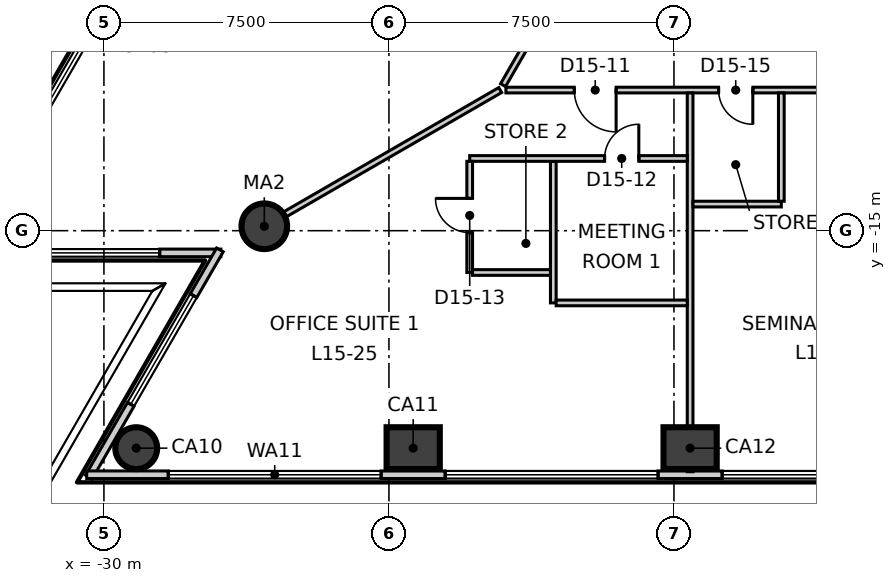
"""IFC4 building model, lengths in metres.
Left out: names, types, materials, properties, quantities, classifications, styles, units other than length and angle.
Written with IfcOpenShell. Run it as: python <this file> out.ifc"""

import sys

from ifc_helpers import new_model, si_unit, direction, frame, frame_2d, origin, origin_2d, place, context, subcontext, project, spatial, rectangle, circle, extrude, element, fill, save


model = new_model("IFC4")
c1 = context("Model", 3, precision=1e-05, world=origin(), true_north=direction((0.0, 1.0)))
c2 = subcontext(c1, "Body", "Model", "MODEL_VIEW")
j1 = project(units=[si_unit("LENGTHUNIT", "METRE"), si_unit("PLANEANGLEUNIT", "RADIAN")], contexts=[c1])
p1 = place(None, origin())
s1 = spatial("IfcSite", under=j1, at=p1, CompositionType="ELEMENT")
p2 = place(p1, origin())
s2 = spatial("IfcBuilding", under=s1, at=p2, CompositionType="ELEMENT")
p3 = place(p2, frame((0.0, 0.0, 71.3)))
s3 = spatial("IfcBuildingStorey", under=s2, at=p3, CompositionType="ELEMENT", Elevation=71.3)
p4 = place(p3, frame((-29.15, -20.722, -0.3), z_axis=(0.0, 0.0, 1.0), x_axis=(1.0, 0.0, 0.0)))
e1 = element("IfcColumn", 1, at=p4, inside=s3, PredefinedType="COLUMN", context=c2, shape_type="SweptSolid", body=[
    extrude(circle(Radius=0.55, at=origin_2d()), origin(), (0.0, 0.0, 1.0), 4.0),
])
for number, where, z_axis, x_axis in (
    (2, (-21.862, -20.722, -0.3), (0.0, 0.0, 1.0), (1.0, 0.0, 0.0)),
    (3, (-14.575, -20.722, -0.3), (0.0, 0.0, 1.0), (1.0, 0.0, 0.0)),
):
    element("IfcColumn", number, at=place(p3, frame(where, z_axis=z_axis, x_axis=x_axis)), inside=s3, PredefinedType="COLUMN", context=c2, shape_type="SweptSolid", body=[
        extrude(rectangle(XDim=1.4, YDim=1.1, at=origin_2d()), origin(), (0.0, 0.0, 1.0), 4.0),
    ])
p5 = place(p3, frame((-25.78, -14.884, -0.3), z_axis=(0.0, 0.0, 1.0), x_axis=(1.0, 0.0, 0.0)))
e4 = element("IfcColumn", 4, at=p5, inside=s3, PredefinedType="COLUMN", context=c2, shape_type="SweptSolid", body=[
    extrude(circle(Radius=0.6, at=origin_2d()), origin(), (0.0, 0.0, 1.0), 4.0),
])
p6 = place(p3, frame((-3.326, 37.084, 0.0), z_axis=(0.0, 0.0, 1.0), x_axis=(-0.500000131003, -0.86602532815, 0.0)))
e5 = element("IfcWall", 5, at=p6, inside=s3, PredefinedType="ELEMENTEDWALL", context=c2, shape_type="SweptSolid", body=[
    extrude(rectangle(XDim=60.886, YDim=0.2, at=frame_2d((30.443, 0.0))), origin(), (0.0, 0.0, 1.0), 3.7),
])
p7 = place(p6, frame((2.146, 0.0, 0.9)))
e6 = element("IfcOpeningElement", 6, at=p7, cuts=e5, PredefinedType="OPENING", context=c2, shape_type="SweptSolid", body=[
    extrude(rectangle(XDim=5.6, YDim=2.5, at=frame_2d((2.8, 1.25))), frame((0.0, 0.11, 0.0), z_axis=(0.0, -1.0, 0.0), x_axis=(1.0, 0.0, 0.0)), (0.0, 0.0, 1.0), 0.22),
])
p8 = place(p6, frame((9.434, 0.0, 0.9)))
e7 = element("IfcOpeningElement", 7, at=p8, cuts=e5, PredefinedType="OPENING", context=c2, shape_type="SweptSolid", body=[
    extrude(rectangle(XDim=5.6, YDim=2.5, at=frame_2d((2.8, 1.25))), frame((0.0, 0.11, 0.0), z_axis=(0.0, -1.0, 0.0), x_axis=(1.0, 0.0, 0.0)), (0.0, 0.0, 1.0), 0.22),
])
p9 = place(p6, frame((16.721, 0.0, 0.9)))
e8 = element("IfcOpeningElement", 8, at=p9, cuts=e5, PredefinedType="OPENING", context=c2, shape_type="SweptSolid", body=[
    extrude(rectangle(XDim=5.6, YDim=2.5, at=frame_2d((2.8, 1.25))), frame((0.0, 0.11, 0.0), z_axis=(0.0, -1.0, 0.0), x_axis=(1.0, 0.0, 0.0)), (0.0, 0.0, 1.0), 0.22),
])
p10 = place(p6, frame((24.009, 0.0, 0.9)))
e9 = element("IfcOpeningElement", 9, at=p10, cuts=e5, PredefinedType="OPENING", context=c2, shape_type="SweptSolid", body=[
    extrude(rectangle(XDim=5.6, YDim=2.5, at=frame_2d((2.8, 1.25))), frame((0.0, 0.11, 0.0), z_axis=(0.0, -1.0, 0.0), x_axis=(1.0, 0.0, 0.0)), (0.0, 0.0, 1.0), 0.22),
])
p11 = place(p6, frame((31.297, 0.0, 0.9)))
e10 = element("IfcOpeningElement", 10, at=p11, cuts=e5, PredefinedType="OPENING", context=c2, shape_type="SweptSolid", body=[
    extrude(rectangle(XDim=5.6, YDim=2.5, at=frame_2d((2.8, 1.25))), frame((0.0, 0.11, 0.0), z_axis=(0.0, -1.0, 0.0), x_axis=(1.0, 0.0, 0.0)), (0.0, 0.0, 1.0), 0.22),
])
p12 = place(p6, frame((38.584, 0.0, 0.9)))
e11 = element("IfcOpeningElement", 11, at=p12, cuts=e5, PredefinedType="OPENING", context=c2, shape_type="SweptSolid", body=[
    extrude(rectangle(XDim=5.6, YDim=2.5, at=frame_2d((2.8, 1.25))), frame((0.0, 0.11, 0.0), z_axis=(0.0, -1.0, 0.0), x_axis=(1.0, 0.0, 0.0)), (0.0, 0.0, 1.0), 0.22),
])
p13 = place(p6, frame((45.872, 0.0, 0.9)))
e12 = element("IfcOpeningElement", 12, at=p13, cuts=e5, PredefinedType="OPENING", context=c2, shape_type="SweptSolid", body=[
    extrude(rectangle(XDim=5.6, YDim=2.5, at=frame_2d((2.8, 1.25))), frame((0.0, 0.11, 0.0), z_axis=(0.0, -1.0, 0.0), x_axis=(1.0, 0.0, 0.0)), (0.0, 0.0, 1.0), 0.22),
])
p14 = place(p6, frame((53.159, 0.0, 0.9)))
e13 = element("IfcOpeningElement", 13, at=p14, cuts=e5, PredefinedType="OPENING", context=c2, shape_type="SweptSolid", body=[
    extrude(rectangle(XDim=5.6, YDim=2.5, at=frame_2d((2.8, 1.25))), frame((0.0, 0.11, 0.0), z_axis=(0.0, -1.0, 0.0), x_axis=(1.0, 0.0, 0.0)), (0.0, 0.0, 1.0), 0.22),
])
p15 = place(p3, frame((-33.824, -15.584, 0.0), z_axis=(0.0, 0.0, 1.0), x_axis=(1.0, 0.0, 0.0)))
e14 = element("IfcWall", 14, at=p15, inside=s3, PredefinedType="ELEMENTEDWALL", context=c2, shape_type="SweptSolid", body=[
    extrude(rectangle(XDim=6.901, YDim=0.2, at=frame_2d((3.45, 0.0))), origin(), (0.0, 0.0, 1.0), 3.7),
])
p16 = place(p15, frame((1.99, 0.0, 0.9)))
e15 = element("IfcOpeningElement", 15, at=p16, cuts=e14, PredefinedType="OPENING", context=c2, shape_type="SweptSolid", body=[
    extrude(rectangle(XDim=3.3, YDim=2.5, at=frame_2d((1.65, 1.25))), frame((0.0, 0.11, 0.0), z_axis=(0.0, -1.0, 0.0), x_axis=(1.0, 0.0, 0.0)), (0.0, 0.0, 1.0), 0.22),
])
p17 = place(p3, frame((-26.948, -15.506, 0.0), z_axis=(0.0, 0.0, 1.0), x_axis=(-0.499917428568, -0.866073071175, 0.0)))
e16 = element("IfcWall", 16, at=p17, inside=s3, PredefinedType="ELEMENTEDWALL", context=c2, shape_type="SweptSolid", body=[
    extrude(rectangle(XDim=6.901, YDim=0.2, at=frame_2d((3.451, 0.0))), origin(), (0.0, 0.0, 1.0), 3.7),
])
p18 = place(p17, frame((1.39, 0.0, 0.9)))
e17 = element("IfcOpeningElement", 17, at=p18, cuts=e16, PredefinedType="OPENING", context=c2, shape_type="SweptSolid", body=[
    extrude(rectangle(XDim=3.3, YDim=2.5, at=frame_2d((1.65, 1.25))), frame((0.0, 0.11, 0.0), z_axis=(0.0, -1.0, 0.0), x_axis=(1.0, 0.0, 0.0)), (0.0, 0.0, 1.0), 0.22),
])
p19 = place(p3, frame((-30.453, -21.422, 0.0), z_axis=(0.0, 0.0, 1.0), x_axis=(1.0, 0.0, 0.0)))
e18 = element("IfcWall", 18, at=p19, inside=s3, PredefinedType="ELEMENTEDWALL", context=c2, shape_type="SweptSolid", body=[
    extrude(rectangle(XDim=60.886, YDim=0.2, at=frame_2d((30.443, 0.0))), origin(), (0.0, 0.0, 1.0), 3.7),
])
p20 = place(p19, frame((2.147, 0.0, 0.9)))
e19 = element("IfcOpeningElement", 19, at=p20, cuts=e18, PredefinedType="OPENING", context=c2, shape_type="SweptSolid", body=[
    extrude(rectangle(XDim=5.6, YDim=2.5, at=frame_2d((2.8, 1.25))), frame((0.0, 0.11, 0.0), z_axis=(0.0, -1.0, 0.0), x_axis=(1.0, 0.0, 0.0)), (0.0, 0.0, 1.0), 0.22),
])
p21 = place(p19, frame((9.434, 0.0, 0.9)))
e20 = element("IfcOpeningElement", 20, at=p21, cuts=e18, PredefinedType="OPENING", context=c2, shape_type="SweptSolid", body=[
    extrude(rectangle(XDim=5.6, YDim=2.5, at=frame_2d((2.8, 1.25))), frame((0.0, 0.11, 0.0), z_axis=(0.0, -1.0, 0.0), x_axis=(1.0, 0.0, 0.0)), (0.0, 0.0, 1.0), 0.22),
])
p22 = place(p19, frame((16.722, 0.0, 0.9)))
e21 = element("IfcOpeningElement", 21, at=p22, cuts=e18, PredefinedType="OPENING", context=c2, shape_type="SweptSolid", body=[
    extrude(rectangle(XDim=5.6, YDim=2.5, at=frame_2d((2.8, 1.25))), frame((0.0, 0.11, 0.0), z_axis=(0.0, -1.0, 0.0), x_axis=(1.0, 0.0, 0.0)), (0.0, 0.0, 1.0), 0.22),
])
p23 = place(p19, frame((24.009, 0.0, 0.9)))
e22 = element("IfcOpeningElement", 22, at=p23, cuts=e18, PredefinedType="OPENING", context=c2, shape_type="SweptSolid", body=[
    extrude(rectangle(XDim=5.6, YDim=2.5, at=frame_2d((2.8, 1.25))), frame((0.0, 0.11, 0.0), z_axis=(0.0, -1.0, 0.0), x_axis=(1.0, 0.0, 0.0)), (0.0, 0.0, 1.0), 0.22),
])
p24 = place(p19, frame((31.297, 0.0, 0.9)))
e23 = element("IfcOpeningElement", 23, at=p24, cuts=e18, PredefinedType="OPENING", context=c2, shape_type="SweptSolid", body=[
    extrude(rectangle(XDim=5.6, YDim=2.5, at=frame_2d((2.8, 1.25))), frame((0.0, 0.11, 0.0), z_axis=(0.0, -1.0, 0.0), x_axis=(1.0, 0.0, 0.0)), (0.0, 0.0, 1.0), 0.22),
])
p25 = place(p19, frame((38.584, 0.0, 0.9)))
e24 = element("IfcOpeningElement", 24, at=p25, cuts=e18, PredefinedType="OPENING", context=c2, shape_type="SweptSolid", body=[
    extrude(rectangle(XDim=5.6, YDim=2.5, at=frame_2d((2.8, 1.25))), frame((0.0, 0.11, 0.0), z_axis=(0.0, -1.0, 0.0), x_axis=(1.0, 0.0, 0.0)), (0.0, 0.0, 1.0), 0.22),
])
p26 = place(p19, frame((45.872, 0.0, 0.9)))
e25 = element("IfcOpeningElement", 25, at=p26, cuts=e18, PredefinedType="OPENING", context=c2, shape_type="SweptSolid", body=[
    extrude(rectangle(XDim=5.6, YDim=2.5, at=frame_2d((2.8, 1.25))), frame((0.0, 0.11, 0.0), z_axis=(0.0, -1.0, 0.0), x_axis=(1.0, 0.0, 0.0)), (0.0, 0.0, 1.0), 0.22),
])
p27 = place(p19, frame((53.159, 0.0, 0.9)))
e26 = element("IfcOpeningElement", 26, at=p27, cuts=e18, PredefinedType="OPENING", context=c2, shape_type="SweptSolid", body=[
    extrude(rectangle(XDim=5.6, YDim=2.5, at=frame_2d((2.8, 1.25))), frame((0.0, 0.11, 0.0), z_axis=(0.0, -1.0, 0.0), x_axis=(1.0, 0.0, 0.0)), (0.0, 0.0, 1.0), 0.22),
])
p28 = place(p3, frame((-26.317, -15.194, 0.0), z_axis=(0.0, 0.0, 1.0), x_axis=(0.866031591824, 0.499989281847, 0.0)))
e27 = element("IfcWall", 27, at=p28, inside=s3, PredefinedType="PARTITIONING", context=c2, shape_type="SweptSolid", body=[
    extrude(rectangle(XDim=7.788, YDim=0.15, at=frame_2d((3.894, 0.0))), origin(), (0.0, 0.0, 1.0), 3.1),
])
p29 = place(p3, frame((-19.497, -11.17, 0.0), z_axis=(0.0, 0.0, 1.0), x_axis=(0.499998854553, 0.866026065108, 0.0)))
e28 = element("IfcWall", 28, at=p29, inside=s3, PredefinedType="PARTITIONING", context=c2, shape_type="SweptSolid", body=[
    extrude(rectangle(XDim=38.994, YDim=0.15, at=frame_2d((19.497, 0.0))), origin(), (0.0, 0.0, 1.0), 3.7),
])
p30 = place(p29, frame((35.944, 0.0, 0.0)))
e29 = element("IfcOpeningElement", 29, at=p30, cuts=e28, PredefinedType="OPENING", context=c2, shape_type="SweptSolid", body=[
    extrude(rectangle(XDim=1.1, YDim=2.1, at=frame_2d((0.55, 1.05))), frame((0.0, 0.085, 0.0), z_axis=(0.0, -1.0, 0.0), x_axis=(1.0, 0.0, 0.0)), (0.0, 0.0, 1.0), 0.17),
])
p31 = place(p29, frame((26.148, 0.0, 0.0)))
e30 = element("IfcOpeningElement", 30, at=p31, cuts=e28, PredefinedType="OPENING", context=c2, shape_type="SweptSolid", body=[
    extrude(rectangle(XDim=1.1, YDim=2.1, at=frame_2d((0.55, 1.05))), frame((0.0, 0.085, 0.0), z_axis=(0.0, -1.0, 0.0), x_axis=(1.0, 0.0, 0.0)), (0.0, 0.0, 1.0), 0.17),
])
p32 = place(p29, frame((8.572, 0.0, 0.0)))
e31 = element("IfcOpeningElement", 31, at=p32, cuts=e28, PredefinedType="OPENING", context=c2, shape_type="SweptSolid", body=[
    extrude(rectangle(XDim=1.1, YDim=2.1, at=frame_2d((0.55, 1.05))), frame((0.0, 0.085, 0.0), z_axis=(0.0, -1.0, 0.0), x_axis=(1.0, 0.0, 0.0)), (0.0, 0.0, 1.0), 0.17),
])
p33 = place(p29, frame((17.172, 0.0, 0.0)))
e32 = element("IfcOpeningElement", 32, at=p33, cuts=e28, PredefinedType="OPENING", context=c2, shape_type="SweptSolid", body=[
    extrude(rectangle(XDim=0.9, YDim=2.1, at=frame_2d((0.45, 1.05))), frame((0.0, 0.085, 0.0), z_axis=(0.0, -1.0, 0.0), x_axis=(1.0, 0.0, 0.0)), (0.0, 0.0, 1.0), 0.17),
])
p34 = place(p29, frame((14.172, 0.0, 0.0)))
e33 = element("IfcOpeningElement", 33, at=p34, cuts=e28, PredefinedType="OPENING", context=c2, shape_type="SweptSolid", body=[
    extrude(rectangle(XDim=0.9, YDim=2.1, at=frame_2d((0.45, 1.05))), frame((0.0, 0.085, 0.0), z_axis=(0.0, -1.0, 0.0), x_axis=(1.0, 0.0, 0.0)), (0.0, 0.0, 1.0), 0.17),
])
p35 = place(p29, frame((1.797, 0.0, 0.0)))
e34 = element("IfcOpeningElement", 34, at=p35, cuts=e28, PredefinedType="OPENING", context=c2, shape_type="SweptSolid", body=[
    extrude(rectangle(XDim=1.1, YDim=2.1, at=frame_2d((0.55, 1.05))), frame((0.0, 0.085, 0.0), z_axis=(0.0, -1.0, 0.0), x_axis=(1.0, 0.0, 0.0)), (0.0, 0.0, 1.0), 0.17),
])
p36 = place(p3, frame((-19.422, -11.3, 0.0), z_axis=(0.0, 0.0, 1.0), x_axis=(1.0, 0.0, 0.0)))
e35 = element("IfcWall", 35, at=p36, inside=s3, PredefinedType="PARTITIONING", context=c2, shape_type="SweptSolid", body=[
    extrude(rectangle(XDim=38.994, YDim=0.15, at=frame_2d((19.497, 0.0))), origin(), (0.0, 0.0, 1.0), 3.7),
])
p37 = place(p36, frame((1.8, 0.0, 0.0)))
e36 = element("IfcOpeningElement", 36, at=p37, cuts=e35, PredefinedType="OPENING", context=c2, shape_type="SweptSolid", body=[
    extrude(rectangle(XDim=1.1, YDim=2.1, at=frame_2d((0.55, 1.05))), frame((0.0, 0.085, 0.0), z_axis=(0.0, -1.0, 0.0), x_axis=(1.0, 0.0, 0.0)), (0.0, 0.0, 1.0), 0.17),
])
p38 = place(p36, frame((9.197, 0.0, 0.0)))
e37 = element("IfcOpeningElement", 37, at=p38, cuts=e35, PredefinedType="OPENING", context=c2, shape_type="SweptSolid", body=[
    extrude(rectangle(XDim=1.0, YDim=2.1, at=frame_2d((0.5, 1.05))), frame((0.0, 0.085, 0.0), z_axis=(0.0, -1.0, 0.0), x_axis=(1.0, 0.0, 0.0)), (0.0, 0.0, 1.0), 0.17),
])
p39 = place(p36, frame((5.597, 0.0, 0.0)))
e38 = element("IfcOpeningElement", 38, at=p39, cuts=e35, PredefinedType="OPENING", context=c2, shape_type="SweptSolid", body=[
    extrude(rectangle(XDim=0.9, YDim=2.1, at=frame_2d((0.45, 1.05))), frame((0.0, 0.085, 0.0), z_axis=(0.0, -1.0, 0.0), x_axis=(1.0, 0.0, 0.0)), (0.0, 0.0, 1.0), 0.17),
])
p40 = place(p36, frame((23.284, 0.0, 0.0)))
e39 = element("IfcOpeningElement", 39, at=p40, cuts=e35, PredefinedType="OPENING", context=c2, shape_type="SweptSolid", body=[
    extrude(rectangle(XDim=1.1, YDim=2.1, at=frame_2d((0.55, 1.05))), frame((0.0, 0.085, 0.0), z_axis=(0.0, -1.0, 0.0), x_axis=(1.0, 0.0, 0.0)), (0.0, 0.0, 1.0), 0.17),
])
p41 = place(p36, frame((13.284, 0.0, 0.0)))
e40 = element("IfcOpeningElement", 40, at=p41, cuts=e35, PredefinedType="OPENING", context=c2, shape_type="SweptSolid", body=[
    extrude(rectangle(XDim=0.9, YDim=2.1, at=frame_2d((0.45, 1.05))), frame((0.0, 0.085, 0.0), z_axis=(0.0, -1.0, 0.0), x_axis=(1.0, 0.0, 0.0)), (0.0, 0.0, 1.0), 0.17),
])
p42 = place(p36, frame((16.484, 0.0, 0.0)))
e41 = element("IfcOpeningElement", 41, at=p42, cuts=e35, PredefinedType="OPENING", context=c2, shape_type="SweptSolid", body=[
    extrude(rectangle(XDim=0.9, YDim=2.1, at=frame_2d((0.45, 1.05))), frame((0.0, 0.085, 0.0), z_axis=(0.0, -1.0, 0.0), x_axis=(1.0, 0.0, 0.0)), (0.0, 0.0, 1.0), 0.17),
])
p43 = place(p36, frame((19.184, 0.0, 0.0)))
e42 = element("IfcOpeningElement", 42, at=p43, cuts=e35, PredefinedType="OPENING", context=c2, shape_type="SweptSolid", body=[
    extrude(rectangle(XDim=1.0, YDim=2.1, at=frame_2d((0.5, 1.05))), frame((0.0, 0.085, 0.0), z_axis=(0.0, -1.0, 0.0), x_axis=(1.0, 0.0, 0.0)), (0.0, 0.0, 1.0), 0.17),
])
p44 = place(p36, frame((29.86, 0.0, 0.0)))
e43 = element("IfcOpeningElement", 43, at=p44, cuts=e35, PredefinedType="OPENING", context=c2, shape_type="SweptSolid", body=[
    extrude(rectangle(XDim=1.0, YDim=2.1, at=frame_2d((0.5, 1.05))), frame((0.0, 0.085, 0.0), z_axis=(0.0, -1.0, 0.0), x_axis=(1.0, 0.0, 0.0)), (0.0, 0.0, 1.0), 0.17),
])
p45 = place(p36, frame((35.947, 0.0, 0.0)))
e44 = element("IfcOpeningElement", 44, at=p45, cuts=e35, PredefinedType="OPENING", context=c2, shape_type="SweptSolid", body=[
    extrude(rectangle(XDim=1.0, YDim=2.1, at=frame_2d((0.5, 1.05))), frame((0.0, 0.085, 0.0), z_axis=(0.0, -1.0, 0.0), x_axis=(1.0, 0.0, 0.0)), (0.0, 0.0, 1.0), 0.17),
])
p46 = place(p3, frame((-14.575, -21.342, 0.0), z_axis=(0.0, 0.0, 1.0), x_axis=(0.0, 1.0, 0.0)))
e45 = element("IfcWall", 45, at=p46, inside=s3, PredefinedType="PARTITIONING", context=c2, shape_type="SweptSolid", body=[
    extrude(rectangle(XDim=9.967, YDim=0.15, at=frame_2d((4.983, 0.0))), origin(), (0.0, 0.0, 1.0), 3.7),
])
p47 = place(p3, frame((-14.5, -14.3, 0.0), z_axis=(0.0, 0.0, 1.0), x_axis=(1.0, 0.0, 0.0)))
e46 = element("IfcWall", 46, at=p47, inside=s3, PredefinedType="PARTITIONING", context=c2, shape_type="SweptSolid", body=[
    extrude(rectangle(XDim=2.325, YDim=0.15, at=frame_2d((1.163, 0.0))), origin(), (0.0, 0.0, 1.0), 3.7),
])
p48 = place(p3, frame((-12.175, -14.225, 0.0), z_axis=(0.0, 0.0, 1.0), x_axis=(0.0, 1.0, 0.0)))
e47 = element("IfcWall", 47, at=p48, inside=s3, PredefinedType="PARTITIONING", context=c2, shape_type="SweptSolid", body=[
    extrude(rectangle(XDim=2.85, YDim=0.15, at=frame_2d((1.425, 0.0))), origin(), (0.0, 0.0, 1.0), 3.7),
])
p49 = place(p3, frame((-18.175, -16.9, 0.0), z_axis=(0.0, 0.0, 1.0), x_axis=(0.0, 1.0, 0.0)))
e48 = element("IfcWall", 48, at=p49, inside=s3, PredefinedType="PARTITIONING", context=c2, shape_type="SweptSolid", body=[
    extrude(rectangle(XDim=3.725, YDim=0.15, at=frame_2d((1.862, 0.0))), origin(), (0.0, 0.0, 1.0), 3.7),
])
p50 = place(p3, frame((-20.375, -13.1, 0.0), z_axis=(0.0, 0.0, 1.0), x_axis=(1.0, 0.0, 0.0)))
e49 = element("IfcWall", 49, at=p50, inside=s3, PredefinedType="PARTITIONING", context=c2, shape_type="SweptSolid", body=[
    extrude(rectangle(XDim=5.725, YDim=0.15, at=frame_2d((2.863, 0.0))), origin(), (0.0, 0.0, 1.0), 3.7),
])
p51 = place(p50, frame((3.55, 0.0, 0.0)))
e50 = element("IfcOpeningElement", 50, at=p51, cuts=e49, PredefinedType="OPENING", context=c2, shape_type="SweptSolid", body=[
    extrude(rectangle(XDim=0.9, YDim=2.1, at=frame_2d((0.45, 1.05))), frame((0.0, 0.085, 0.0), z_axis=(0.0, -1.0, 0.0), x_axis=(1.0, 0.0, 0.0)), (0.0, 0.0, 1.0), 0.17),
])
p52 = place(p3, frame((-20.375, -16.1, 0.0), z_axis=(0.0, 0.0, 1.0), x_axis=(0.0, 1.0, 0.0)))
e51 = element("IfcWall", 51, at=p52, inside=s3, PredefinedType="PARTITIONING", context=c2, shape_type="SweptSolid", body=[
    extrude(rectangle(XDim=2.925, YDim=0.15, at=frame_2d((1.462, 0.0))), origin(), (0.0, 0.0, 1.0), 3.7),
])
p53 = place(p52, frame((1.05, 0.0, 0.0)))
e52 = element("IfcOpeningElement", 52, at=p53, cuts=e51, PredefinedType="OPENING", context=c2, shape_type="SweptSolid", body=[
    extrude(rectangle(XDim=0.9, YDim=2.1, at=frame_2d((0.45, 1.05))), frame((0.0, 0.085, 0.0), z_axis=(0.0, -1.0, 0.0), x_axis=(1.0, 0.0, 0.0)), (0.0, 0.0, 1.0), 0.17),
])
p54 = place(p3, frame((-20.3, -16.1, 0.0), z_axis=(0.0, 0.0, 1.0), x_axis=(1.0, 0.0, 0.0)))
e53 = element("IfcWall", 53, at=p54, inside=s3, PredefinedType="PARTITIONING", context=c2, shape_type="SweptSolid", body=[
    extrude(rectangle(XDim=2.05, YDim=0.15, at=frame_2d((1.025, 0.0))), origin(), (0.0, 0.0, 1.0), 3.7),
])
p55 = place(p3, frame((-18.1, -16.9, 0.0), z_axis=(0.0, 0.0, 1.0), x_axis=(1.0, 0.0, 0.0)))
e54 = element("IfcWall", 54, at=p55, inside=s3, PredefinedType="PARTITIONING", context=c2, shape_type="SweptSolid", body=[
    extrude(rectangle(XDim=3.45, YDim=0.15, at=frame_2d((1.725, 0.0))), origin(), (0.0, 0.0, 1.0), 3.7),
])
p56 = place(p14, origin())
e55 = element("IfcWindow", 55, at=p56, inside=s3, PartitioningType="SINGLE_PANEL", PredefinedType="WINDOW", context=c2, shape_type="SweptSolid", body=[
    extrude(rectangle(XDim=5.6, YDim=2.5, at=frame_2d((2.8, 1.25))), frame((0.0, 0.03, 0.0), z_axis=(0.0, -1.0, 0.0), x_axis=(1.0, 0.0, 0.0)), (0.0, 0.0, 1.0), 0.06),
])
fill(e13, e55)
p57 = place(p16, origin())
e56 = element("IfcWindow", 56, at=p57, inside=s3, PartitioningType="SINGLE_PANEL", PredefinedType="WINDOW", context=c2, shape_type="SweptSolid", body=[
    extrude(rectangle(XDim=3.3, YDim=2.5, at=frame_2d((1.65, 1.25))), frame((0.0, 0.03, 0.0), z_axis=(0.0, -1.0, 0.0), x_axis=(1.0, 0.0, 0.0)), (0.0, 0.0, 1.0), 0.06),
])
fill(e15, e56)
p58 = place(p18, origin())
e57 = element("IfcWindow", 57, at=p58, inside=s3, PartitioningType="SINGLE_PANEL", PredefinedType="WINDOW", context=c2, shape_type="SweptSolid", body=[
    extrude(rectangle(XDim=3.3, YDim=2.5, at=frame_2d((1.65, 1.25))), frame((0.0, 0.03, 0.0), z_axis=(0.0, -1.0, 0.0), x_axis=(1.0, 0.0, 0.0)), (0.0, 0.0, 1.0), 0.06),
])
fill(e17, e57)
p59 = place(p20, origin())
e58 = element("IfcWindow", 58, at=p59, inside=s3, PartitioningType="SINGLE_PANEL", PredefinedType="WINDOW", context=c2, shape_type="SweptSolid", body=[
    extrude(rectangle(XDim=5.6, YDim=2.5, at=frame_2d((2.8, 1.25))), frame((0.0, 0.03, 0.0), z_axis=(0.0, -1.0, 0.0), x_axis=(1.0, 0.0, 0.0)), (0.0, 0.0, 1.0), 0.06),
])
fill(e19, e58)
p60 = place(p21, origin())
e59 = element("IfcWindow", 59, at=p60, inside=s3, PartitioningType="SINGLE_PANEL", PredefinedType="WINDOW", context=c2, shape_type="SweptSolid", body=[
    extrude(rectangle(XDim=5.6, YDim=2.5, at=frame_2d((2.8, 1.25))), frame((0.0, 0.03, 0.0), z_axis=(0.0, -1.0, 0.0), x_axis=(1.0, 0.0, 0.0)), (0.0, 0.0, 1.0), 0.06),
])
fill(e20, e59)
p61 = place(p22, origin())
e60 = element("IfcWindow", 60, at=p61, inside=s3, PartitioningType="SINGLE_PANEL", PredefinedType="WINDOW", context=c2, shape_type="SweptSolid", body=[
    extrude(rectangle(XDim=5.6, YDim=2.5, at=frame_2d((2.8, 1.25))), frame((0.0, 0.03, 0.0), z_axis=(0.0, -1.0, 0.0), x_axis=(1.0, 0.0, 0.0)), (0.0, 0.0, 1.0), 0.06),
])
fill(e21, e60)
p62 = place(p37, origin())
e61 = element("IfcDoor", 61, at=p62, inside=s3, OperationType="SINGLE_SWING_RIGHT", PredefinedType="DOOR", context=c2, shape_type="SweptSolid", body=[
    extrude(rectangle(XDim=1.1, YDim=2.1, at=frame_2d((0.55, 1.05))), frame((0.0, 0.025, 0.0), z_axis=(0.0, -1.0, 0.0), x_axis=(1.0, 0.0, 0.0)), (0.0, 0.0, 1.0), 0.05),
])
fill(e36, e61)
p63 = place(p51, origin())
e62 = element("IfcDoor", 62, at=p63, inside=s3, OperationType="SINGLE_SWING_LEFT", PredefinedType="DOOR", context=c2, shape_type="SweptSolid", body=[
    extrude(rectangle(XDim=0.9, YDim=2.1, at=frame_2d((0.45, 1.05))), frame((0.0, 0.025, 0.0), z_axis=(0.0, -1.0, 0.0), x_axis=(1.0, 0.0, 0.0)), (0.0, 0.0, 1.0), 0.05),
])
fill(e50, e62)
p64 = place(p53, origin())
e63 = element("IfcDoor", 63, at=p64, inside=s3, OperationType="SINGLE_SWING_LEFT", PredefinedType="DOOR", context=c2, shape_type="SweptSolid", body=[
    extrude(rectangle(XDim=0.9, YDim=2.1, at=frame_2d((0.45, 1.05))), frame((0.0, 0.025, 0.0), z_axis=(0.0, -1.0, 0.0), x_axis=(1.0, 0.0, 0.0)), (0.0, 0.0, 1.0), 0.05),
])
fill(e52, e63)
p65 = place(p39, origin())
e64 = element("IfcDoor", 64, at=p65, inside=s3, OperationType="SINGLE_SWING_RIGHT", PredefinedType="DOOR", context=c2, shape_type="SweptSolid", body=[
    extrude(rectangle(XDim=0.9, YDim=2.1, at=frame_2d((0.45, 1.05))), frame((0.0, 0.025, 0.0), z_axis=(0.0, -1.0, 0.0), x_axis=(1.0, 0.0, 0.0)), (0.0, 0.0, 1.0), 0.05),
])
fill(e38, e64)
save(model, sys.argv[1])
